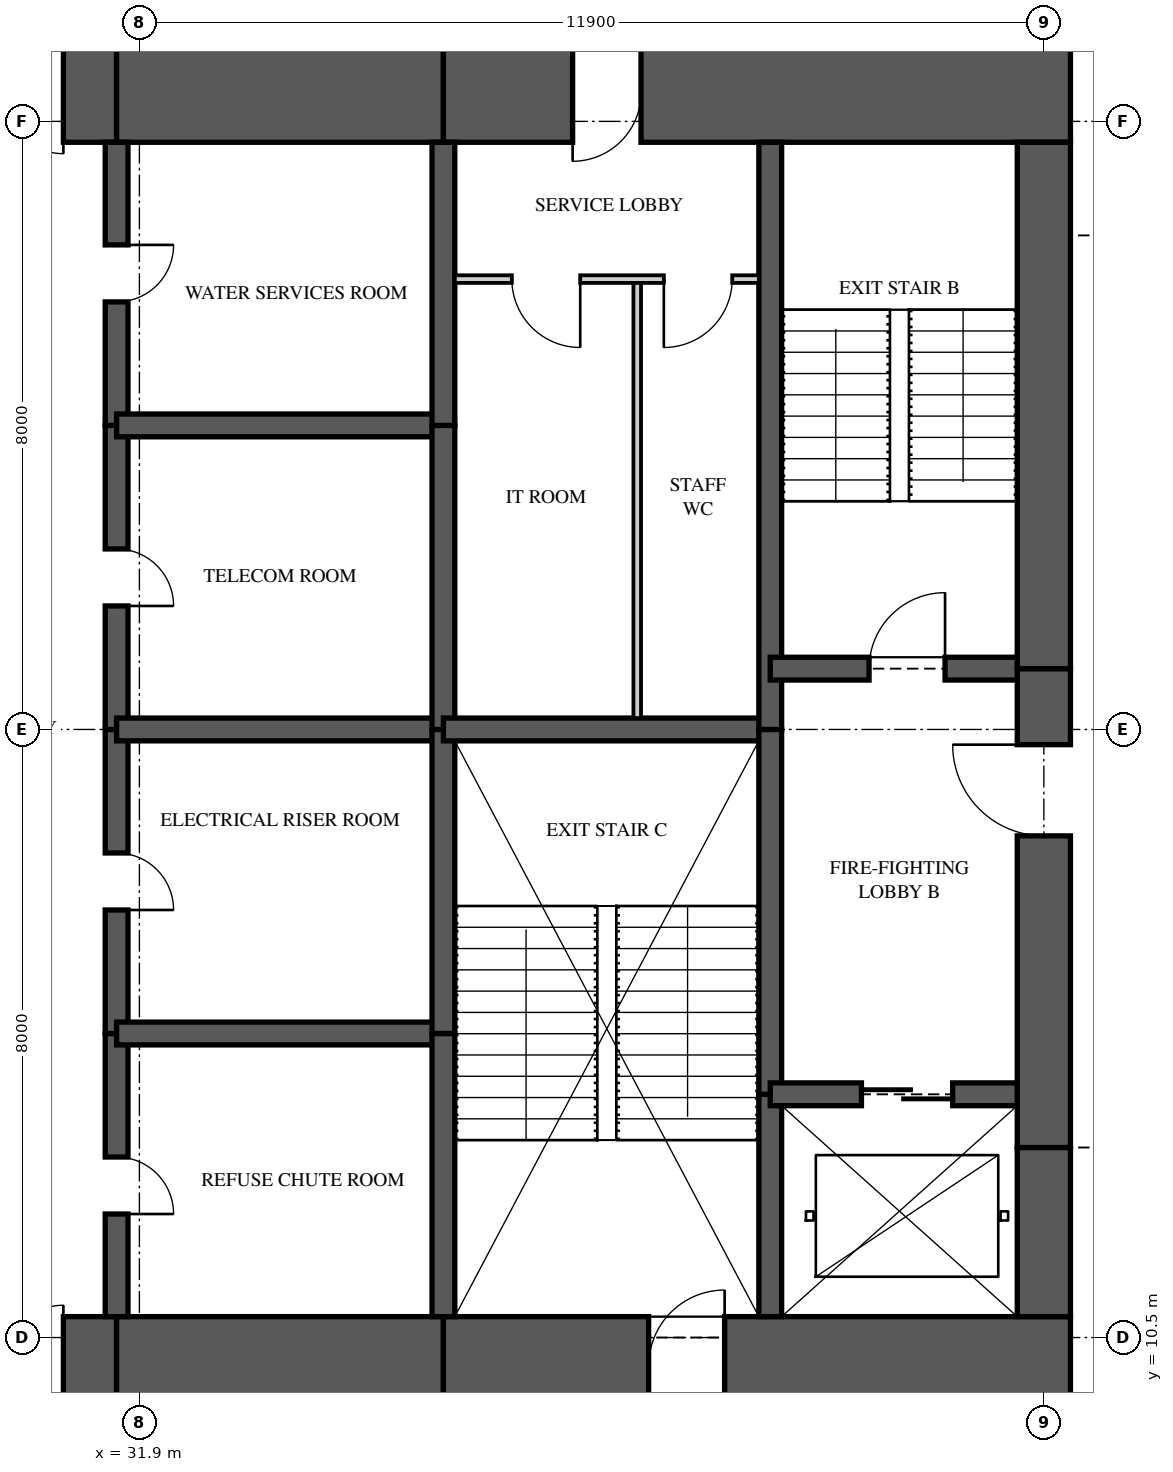
"""IFC4 building model, lengths in metres.
Left out: names, types, materials, properties, quantities, classifications, styles, units other than length and angle.
Written with IfcOpenShell. Run it as: python <this file> out.ifc"""

import sys

from ifc_helpers import new_model, si_unit, direction, frame, frame_2d, origin, place, context, subcontext, project, spatial, rectangle, extrude, element, fill, save


model = new_model("IFC4")
c1 = context("Model", 3, precision=1e-05, world=origin(), true_north=direction((0.0, 1.0)))
c2 = subcontext(c1, "Body", "Model", "MODEL_VIEW")
j1 = project(units=[si_unit("LENGTHUNIT", "METRE"), si_unit("PLANEANGLEUNIT", "RADIAN")], contexts=[c1])
p1 = place(None, origin())
s1 = spatial("IfcSite", under=j1, at=p1, CompositionType="ELEMENT")
p2 = place(p1, origin())
s2 = spatial("IfcBuilding", under=s1, at=p2, CompositionType="ELEMENT")
p3 = place(p2, frame((0.0, 0.0, 164.4)))
s3 = spatial("IfcBuildingStorey", under=s2, at=p3, CompositionType="ELEMENT", Elevation=164.4)
p4 = place(p3, frame((26.0, 10.125, 0.0), z_axis=(0.0, 0.0, 1.0), x_axis=(1.0, 0.0, 0.0)))
e1 = element("IfcWall", 1, at=p4, inside=s3, PredefinedType="SHEAR", context=c2, shape_type="SweptSolid", body=[
    extrude(rectangle(XDim=5.6, YDim=1.3, at=frame_2d((2.8, 0.0))), origin(), (0.0, 0.0, 1.0), 3.35),
])
p5 = place(p4, frame((3.3, 0.0, 0.0)))
e2 = element("IfcOpeningElement", 2, at=p5, cuts=e1, PredefinedType="OPENING", context=c2, shape_type="SweptSolid", body=[
    extrude(rectangle(XDim=1.6, YDim=2.1, at=frame_2d((0.8, 1.05))), frame((0.0, 0.66, 0.0), z_axis=(0.0, -1.0, 0.0), x_axis=(1.0, 0.0, 0.0)), (0.0, 0.0, 1.0), 1.32),
])
p6 = place(p3, frame((31.6, 10.125, 0.0), z_axis=(0.0, 0.0, 1.0), x_axis=(1.0, 0.0, 0.0)))
e3 = element("IfcWall", 3, at=p6, inside=s3, PredefinedType="SHEAR", context=c2, shape_type="SweptSolid", body=[
    extrude(rectangle(XDim=4.3, YDim=1.3, at=frame_2d((2.15, 0.0))), origin(), (0.0, 0.0, 1.0), 3.35),
])
p7 = place(p3, frame((35.9, 10.125, 0.0), z_axis=(0.0, 0.0, 1.0), x_axis=(1.0, 0.0, 0.0)))
e4 = element("IfcWall", 4, at=p7, inside=s3, PredefinedType="SHEAR", context=c2, shape_type="SweptSolid", body=[
    extrude(rectangle(XDim=8.25, YDim=1.3, at=frame_2d((4.125, 0.0))), origin(), (0.0, 0.0, 1.0), 3.35),
])
p8 = place(p7, frame((2.7, 0.0, 0.0)))
e5 = element("IfcOpeningElement", 5, at=p8, cuts=e4, PredefinedType="OPENING", context=c2, shape_type="SweptSolid", body=[
    extrude(rectangle(XDim=1.0, YDim=2.1, at=frame_2d((0.5, 1.05))), frame((0.0, 0.66, 0.0), z_axis=(0.0, -1.0, 0.0), x_axis=(1.0, 0.0, 0.0)), (0.0, 0.0, 1.0), 1.32),
])
p9 = place(p3, frame((44.15, 26.875, 0.0), z_axis=(0.0, 0.0, 1.0), x_axis=(-1.0, 0.0, 0.0)))
e6 = element("IfcWall", 6, at=p9, inside=s3, PredefinedType="SHEAR", context=c2, shape_type="SweptSolid", body=[
    extrude(rectangle(XDim=8.25, YDim=1.3, at=frame_2d((4.125, 0.0))), origin(), (0.0, 0.0, 1.0), 3.35),
])
p10 = place(p9, frame((5.65, 0.0, 0.0)))
e7 = element("IfcOpeningElement", 7, at=p10, cuts=e6, PredefinedType="OPENING", context=c2, shape_type="SweptSolid", body=[
    extrude(rectangle(XDim=0.9, YDim=2.1, at=frame_2d((0.45, 1.05))), frame((0.0, 0.66, 0.0), z_axis=(0.0, -1.0, 0.0), x_axis=(1.0, 0.0, 0.0)), (0.0, 0.0, 1.0), 1.32),
])
p11 = place(p3, frame((35.9, 26.875, 0.0), z_axis=(0.0, 0.0, 1.0), x_axis=(-1.0, 0.0, 0.0)))
e8 = element("IfcWall", 8, at=p11, inside=s3, PredefinedType="SHEAR", context=c2, shape_type="SweptSolid", body=[
    extrude(rectangle(XDim=4.3, YDim=1.3, at=frame_2d((2.15, 0.0))), origin(), (0.0, 0.0, 1.0), 3.35),
])
p12 = place(p3, frame((31.6, 26.875, 0.0), z_axis=(0.0, 0.0, 1.0), x_axis=(-1.0, 0.0, 0.0)))
e9 = element("IfcWall", 9, at=p12, inside=s3, PredefinedType="SHEAR", context=c2, shape_type="SweptSolid", body=[
    extrude(rectangle(XDim=5.6, YDim=1.3, at=frame_2d((2.8, 0.0))), origin(), (0.0, 0.0, 1.0), 3.35),
])
p13 = place(p12, frame((0.7, 0.0, 0.0)))
e10 = element("IfcOpeningElement", 10, at=p13, cuts=e9, PredefinedType="OPENING", context=c2, shape_type="SweptSolid", body=[
    extrude(rectangle(XDim=1.6, YDim=2.1, at=frame_2d((0.8, 1.05))), frame((0.0, 0.66, 0.0), z_axis=(0.0, -1.0, 0.0), x_axis=(1.0, 0.0, 0.0)), (0.0, 0.0, 1.0), 1.32),
])
p14 = place(p3, frame((43.8, 10.775, 0.0), z_axis=(0.0, 0.0, 1.0), x_axis=(0.0, 1.0, 0.0)))
e11 = element("IfcWall", 11, at=p14, inside=s3, PredefinedType="SHEAR", context=c2, shape_type="SweptSolid", body=[
    extrude(rectangle(XDim=2.225, YDim=0.7, at=frame_2d((1.113, 0.0))), origin(), (0.0, 0.0, 1.0), 3.35),
])
p15 = place(p3, frame((43.8, 13.0, 0.0), z_axis=(0.0, 0.0, 1.0), x_axis=(0.0, 1.0, 0.0)))
e12 = element("IfcWall", 12, at=p15, inside=s3, PredefinedType="SHEAR", context=c2, shape_type="SweptSolid", body=[
    extrude(rectangle(XDim=6.3, YDim=0.7, at=frame_2d((3.15, 0.0))), origin(), (0.0, 0.0, 1.0), 3.35),
])
p16 = place(p15, frame((4.1, 0.0, 0.0)))
e13 = element("IfcOpeningElement", 13, at=p16, cuts=e12, PredefinedType="OPENING", context=c2, shape_type="SweptSolid", body=[
    extrude(rectangle(XDim=1.2, YDim=2.2, at=frame_2d((0.6, 1.1))), frame((0.0, 0.36, 0.0), z_axis=(0.0, -1.0, 0.0), x_axis=(1.0, 0.0, 0.0)), (0.0, 0.0, 1.0), 0.72),
])
p17 = place(p3, frame((43.8, 19.3, 0.0), z_axis=(0.0, 0.0, 1.0), x_axis=(0.0, 1.0, 0.0)))
e14 = element("IfcWall", 14, at=p17, inside=s3, PredefinedType="SHEAR", context=c2, shape_type="SweptSolid", body=[
    extrude(rectangle(XDim=6.925, YDim=0.7, at=frame_2d((3.462, 0.0))), origin(), (0.0, 0.0, 1.0), 3.35),
])
p18 = place(p3, frame((31.6, 10.775, 0.0), z_axis=(0.0, 0.0, 1.0), x_axis=(0.0, 1.0, 0.0)))
e15 = element("IfcWall", 15, at=p18, inside=s3, PredefinedType="SHEAR", context=c2, shape_type="SweptSolid", body=[
    extrude(rectangle(XDim=3.725, YDim=0.3, at=frame_2d((1.863, 0.0))), origin(), (0.0, 0.0, 1.0), 3.35),
])
p19 = place(p18, frame((1.35, 0.0, 0.0)))
e16 = element("IfcOpeningElement", 16, at=p19, cuts=e15, PredefinedType="OPENING", context=c2, shape_type="SweptSolid", body=[
    extrude(rectangle(XDim=0.75, YDim=2.1, at=frame_2d((0.375, 1.05))), frame((0.0, 0.16, 0.0), z_axis=(0.0, -1.0, 0.0), x_axis=(1.0, 0.0, 0.0)), (0.0, 0.0, 1.0), 0.32),
])
p20 = place(p3, frame((31.6, 14.5, 0.0), z_axis=(0.0, 0.0, 1.0), x_axis=(0.0, 1.0, 0.0)))
e17 = element("IfcWall", 17, at=p20, inside=s3, PredefinedType="SHEAR", context=c2, shape_type="SweptSolid", body=[
    extrude(rectangle(XDim=4.0, YDim=0.3, at=frame_2d((2.0, 0.0))), origin(), (0.0, 0.0, 1.0), 3.35),
])
p21 = place(p20, frame((1.625, 0.0, 0.0)))
e18 = element("IfcOpeningElement", 18, at=p21, cuts=e17, PredefinedType="OPENING", context=c2, shape_type="SweptSolid", body=[
    extrude(rectangle(XDim=0.75, YDim=2.1, at=frame_2d((0.375, 1.05))), frame((0.0, 0.16, 0.0), z_axis=(0.0, -1.0, 0.0), x_axis=(1.0, 0.0, 0.0)), (0.0, 0.0, 1.0), 0.32),
])
p22 = place(p3, frame((31.6, 18.5, 0.0), z_axis=(0.0, 0.0, 1.0), x_axis=(0.0, 1.0, 0.0)))
e19 = element("IfcWall", 19, at=p22, inside=s3, PredefinedType="SHEAR", context=c2, shape_type="SweptSolid", body=[
    extrude(rectangle(XDim=4.0, YDim=0.3, at=frame_2d((2.0, 0.0))), origin(), (0.0, 0.0, 1.0), 3.35),
])
p23 = place(p22, frame((1.625, 0.0, 0.0)))
e20 = element("IfcOpeningElement", 20, at=p23, cuts=e19, PredefinedType="OPENING", context=c2, shape_type="SweptSolid", body=[
    extrude(rectangle(XDim=0.75, YDim=2.1, at=frame_2d((0.375, 1.05))), frame((0.0, 0.16, 0.0), z_axis=(0.0, -1.0, 0.0), x_axis=(1.0, 0.0, 0.0)), (0.0, 0.0, 1.0), 0.32),
])
p24 = place(p3, frame((31.6, 22.5, 0.0), z_axis=(0.0, 0.0, 1.0), x_axis=(0.0, 1.0, 0.0)))
e21 = element("IfcWall", 21, at=p24, inside=s3, PredefinedType="SHEAR", context=c2, shape_type="SweptSolid", body=[
    extrude(rectangle(XDim=3.725, YDim=0.3, at=frame_2d((1.863, 0.0))), origin(), (0.0, 0.0, 1.0), 3.35),
])
p25 = place(p24, frame((1.625, 0.0, 0.0)))
e22 = element("IfcOpeningElement", 22, at=p25, cuts=e21, PredefinedType="OPENING", context=c2, shape_type="SweptSolid", body=[
    extrude(rectangle(XDim=0.75, YDim=2.1, at=frame_2d((0.375, 1.05))), frame((0.0, 0.16, 0.0), z_axis=(0.0, -1.0, 0.0), x_axis=(1.0, 0.0, 0.0)), (0.0, 0.0, 1.0), 0.32),
])
p26 = place(p3, frame((35.9, 10.775, 0.0), z_axis=(0.0, 0.0, 1.0), x_axis=(0.0, 1.0, 0.0)))
e23 = element("IfcWall", 23, at=p26, inside=s3, PredefinedType="SHEAR", context=c2, shape_type="SweptSolid", body=[
    extrude(rectangle(XDim=3.725, YDim=0.3, at=frame_2d((1.863, 0.0))), origin(), (0.0, 0.0, 1.0), 3.35),
])
for number, where, z_axis, x_axis in (
    (24, (35.9, 14.5, 0.0), (0.0, 0.0, 1.0), (0.0, 1.0, 0.0)),
    (25, (35.9, 18.5, 0.0), (0.0, 0.0, 1.0), (0.0, 1.0, 0.0)),
):
    element("IfcWall", number, at=place(p3, frame(where, z_axis=z_axis, x_axis=x_axis)), inside=s3, PredefinedType="SHEAR", context=c2, shape_type="SweptSolid", body=[
        extrude(rectangle(XDim=4.0, YDim=0.3, at=frame_2d((2.0, 0.0))), origin(), (0.0, 0.0, 1.0), 3.35),
    ])
p27 = place(p3, frame((35.9, 22.5, 0.0), z_axis=(0.0, 0.0, 1.0), x_axis=(0.0, 1.0, 0.0)))
e26 = element("IfcWall", 26, at=p27, inside=s3, PredefinedType="SHEAR", context=c2, shape_type="SweptSolid", body=[
    extrude(rectangle(XDim=3.725, YDim=0.3, at=frame_2d((1.863, 0.0))), origin(), (0.0, 0.0, 1.0), 3.35),
])
p28 = place(p3, frame((40.2, 10.775, 0.0), z_axis=(0.0, 0.0, 1.0), x_axis=(0.0, 1.0, 0.0)))
e27 = element("IfcWall", 27, at=p28, inside=s3, PredefinedType="SHEAR", context=c2, shape_type="SweptSolid", body=[
    extrude(rectangle(XDim=2.925, YDim=0.3, at=frame_2d((1.462, 0.0))), origin(), (0.0, 0.0, 1.0), 3.35),
])
p29 = place(p3, frame((40.2, 13.7, 0.0), z_axis=(0.0, 0.0, 1.0), x_axis=(0.0, 1.0, 0.0)))
e28 = element("IfcWall", 28, at=p29, inside=s3, PredefinedType="SHEAR", context=c2, shape_type="SweptSolid", body=[
    extrude(rectangle(XDim=4.8, YDim=0.3, at=frame_2d((2.4, 0.0))), origin(), (0.0, 0.0, 1.0), 3.35),
])
p30 = place(p3, frame((40.2, 18.5, 0.0), z_axis=(0.0, 0.0, 1.0), x_axis=(0.0, 1.0, 0.0)))
e29 = element("IfcWall", 29, at=p30, inside=s3, PredefinedType="SHEAR", context=c2, shape_type="SweptSolid", body=[
    extrude(rectangle(XDim=7.725, YDim=0.3, at=frame_2d((3.863, 0.0))), origin(), (0.0, 0.0, 1.0), 3.35),
])
for number, where, z_axis, x_axis in (
    (30, (31.6, 14.5, 0.0), (0.0, 0.0, 1.0), (1.0, 0.0, 0.0)),
    (31, (31.6, 18.5, 0.0), (0.0, 0.0, 1.0), (1.0, 0.0, 0.0)),
    (32, (31.6, 22.5, 0.0), (0.0, 0.0, 1.0), (1.0, 0.0, 0.0)),
):
    element("IfcWall", number, at=place(p3, frame(where, z_axis=z_axis, x_axis=x_axis)), inside=s3, PredefinedType="SHEAR", context=c2, shape_type="SweptSolid", body=[
        extrude(rectangle(XDim=4.3, YDim=0.3, at=frame_2d((2.15, 0.0))), origin(), (0.0, 0.0, 1.0), 3.35),
    ])
p31 = place(p3, frame((35.9, 18.5, 0.0), z_axis=(0.0, 0.0, 1.0), x_axis=(1.0, 0.0, 0.0)))
e33 = element("IfcWall", 33, at=p31, inside=s3, PredefinedType="SHEAR", context=c2, shape_type="SweptSolid", body=[
    extrude(rectangle(XDim=4.3, YDim=0.3, at=frame_2d((2.15, 0.0))), origin(), (0.0, 0.0, 1.0), 3.35),
])
p32 = place(p3, frame((40.2, 13.7, 0.0), z_axis=(0.0, 0.0, 1.0), x_axis=(1.0, 0.0, 0.0)))
e34 = element("IfcWall", 34, at=p32, inside=s3, PredefinedType="SHEAR", context=c2, shape_type="SweptSolid", body=[
    extrude(rectangle(XDim=3.6, YDim=0.3, at=frame_2d((1.8, 0.0))), origin(), (0.0, 0.0, 1.0), 3.35),
])
p33 = place(p32, frame((1.2, 0.0, 0.0)))
e35 = element("IfcOpeningElement", 35, at=p33, cuts=e34, PredefinedType="OPENING", context=c2, shape_type="SweptSolid", body=[
    extrude(rectangle(XDim=1.2, YDim=2.1, at=frame_2d((0.6, 1.05))), frame((0.0, 0.16, 0.0), z_axis=(0.0, -1.0, 0.0), x_axis=(1.0, 0.0, 0.0)), (0.0, 0.0, 1.0), 0.32),
])
p34 = place(p3, frame((40.2, 19.3, 0.0), z_axis=(0.0, 0.0, 1.0), x_axis=(1.0, 0.0, 0.0)))
e36 = element("IfcWall", 36, at=p34, inside=s3, PredefinedType="SHEAR", context=c2, shape_type="SweptSolid", body=[
    extrude(rectangle(XDim=3.6, YDim=0.3, at=frame_2d((1.8, 0.0))), origin(), (0.0, 0.0, 1.0), 3.35),
])
p35 = place(p34, frame((1.3, 0.0, 0.0)))
e37 = element("IfcOpeningElement", 37, at=p35, cuts=e36, PredefinedType="OPENING", context=c2, shape_type="SweptSolid", body=[
    extrude(rectangle(XDim=1.0, YDim=2.1, at=frame_2d((0.5, 1.05))), frame((0.0, 0.16, 0.0), z_axis=(0.0, -1.0, 0.0), x_axis=(1.0, 0.0, 0.0)), (0.0, 0.0, 1.0), 0.32),
])
p36 = place(p3, frame((36.05, 24.425, 0.0), z_axis=(0.0, 0.0, 1.0), x_axis=(1.0, 0.0, 0.0)))
e38 = element("IfcWall", 38, at=p36, inside=s3, PredefinedType="PARTITIONING", context=c2, shape_type="SweptSolid", body=[
    extrude(rectangle(XDim=4.0, YDim=0.1, at=frame_2d((2.0, 0.0))), origin(), (0.0, 0.0, 1.0), 3.11),
])
p37 = place(p36, frame((0.75, 0.0, 0.0)))
e39 = element("IfcOpeningElement", 39, at=p37, cuts=e38, PredefinedType="OPENING", context=c2, shape_type="SweptSolid", body=[
    extrude(rectangle(XDim=0.9, YDim=2.1, at=frame_2d((0.45, 1.05))), frame((0.0, 0.06, 0.0), z_axis=(0.0, -1.0, 0.0), x_axis=(1.0, 0.0, 0.0)), (0.0, 0.0, 1.0), 0.12),
])
p38 = place(p36, frame((2.75, 0.0, 0.0)))
e40 = element("IfcOpeningElement", 40, at=p38, cuts=e38, PredefinedType="OPENING", context=c2, shape_type="SweptSolid", body=[
    extrude(rectangle(XDim=0.9, YDim=2.1, at=frame_2d((0.45, 1.05))), frame((0.0, 0.06, 0.0), z_axis=(0.0, -1.0, 0.0), x_axis=(1.0, 0.0, 0.0)), (0.0, 0.0, 1.0), 0.12),
])
p39 = place(p3, frame((38.45, 18.65, 0.0), z_axis=(0.0, 0.0, 1.0), x_axis=(0.0, 1.0, 0.0)))
e41 = element("IfcWall", 41, at=p39, inside=s3, PredefinedType="PARTITIONING", context=c2, shape_type="SweptSolid", body=[
    extrude(rectangle(XDim=5.725, YDim=0.1, at=frame_2d((2.863, 0.0))), origin(), (0.0, 0.0, 1.0), 3.11),
])
p40 = place(p37, frame((0.9, 0.0, 0.0), z_axis=(0.0, 0.0, 1.0), x_axis=(-1.0, 0.0, 0.0)))
e42 = element("IfcDoor", 42, at=p40, inside=s3, OperationType="SINGLE_SWING_LEFT", PredefinedType="DOOR", context=c2, shape_type="SweptSolid", body=[
    extrude(rectangle(XDim=0.9, YDim=2.1, at=frame_2d((0.45, 1.05))), frame((0.0, 0.025, 0.0), z_axis=(0.0, -1.0, 0.0), x_axis=(1.0, 0.0, 0.0)), (0.0, 0.0, 1.0), 0.05),
])
fill(e39, e42)
p41 = place(p38, frame((0.9, 0.0, 0.0), z_axis=(0.0, 0.0, 1.0), x_axis=(-1.0, 0.0, 0.0)))
e43 = element("IfcDoor", 43, at=p41, inside=s3, OperationType="SINGLE_SWING_RIGHT", PredefinedType="DOOR", context=c2, shape_type="SweptSolid", body=[
    extrude(rectangle(XDim=0.9, YDim=2.1, at=frame_2d((0.45, 1.05))), frame((0.0, 0.025, 0.0), z_axis=(0.0, -1.0, 0.0), x_axis=(1.0, 0.0, 0.0)), (0.0, 0.0, 1.0), 0.05),
])
fill(e40, e43)
p42 = place(p35, origin())
e44 = element("IfcDoor", 44, at=p42, inside=s3, OperationType="SINGLE_SWING_RIGHT", PredefinedType="DOOR", context=c2, shape_type="SweptSolid", body=[
    extrude(rectangle(XDim=1.0, YDim=2.1, at=frame_2d((0.5, 1.05))), frame((0.0, 0.025, 0.0), z_axis=(0.0, -1.0, 0.0), x_axis=(1.0, 0.0, 0.0)), (0.0, 0.0, 1.0), 0.05),
])
fill(e37, e44)
p43 = place(p16, origin())
e45 = element("IfcDoor", 45, at=p43, inside=s3, OperationType="SINGLE_SWING_RIGHT", PredefinedType="DOOR", context=c2, shape_type="SweptSolid", body=[
    extrude(rectangle(XDim=1.2, YDim=2.2, at=frame_2d((0.6, 1.1))), frame((0.0, 0.025, 0.0), z_axis=(0.0, -1.0, 0.0), x_axis=(1.0, 0.0, 0.0)), (0.0, 0.0, 1.0), 0.05),
])
fill(e13, e45)
p44 = place(p33, origin())
e46 = element("IfcDoor", 46, at=p44, inside=s3, OperationType="SLIDING_TO_LEFT", PredefinedType="DOOR", context=c2, shape_type="SweptSolid", body=[
    extrude(rectangle(XDim=1.2, YDim=2.1, at=frame_2d((0.6, 1.05))), frame((0.0, 0.025, 0.0), z_axis=(0.0, -1.0, 0.0), x_axis=(1.0, 0.0, 0.0)), (0.0, 0.0, 1.0), 0.05),
])
fill(e35, e46)
p45 = place(p5, origin())
e47 = element("IfcDoor", 47, at=p45, inside=s3, OperationType="DOUBLE_DOOR_SINGLE_SWING", PredefinedType="DOOR", context=c2, shape_type="SweptSolid", body=[
    extrude(rectangle(XDim=1.6, YDim=2.1, at=frame_2d((0.8, 1.05))), frame((0.0, 0.025, 0.0), z_axis=(0.0, -1.0, 0.0), x_axis=(1.0, 0.0, 0.0)), (0.0, 0.0, 1.0), 0.05),
])
fill(e2, e47)
p46 = place(p13, origin())
e48 = element("IfcDoor", 48, at=p46, inside=s3, OperationType="DOUBLE_DOOR_SINGLE_SWING", PredefinedType="DOOR", context=c2, shape_type="SweptSolid", body=[
    extrude(rectangle(XDim=1.6, YDim=2.1, at=frame_2d((0.8, 1.05))), frame((0.0, 0.025, 0.0), z_axis=(0.0, -1.0, 0.0), x_axis=(1.0, 0.0, 0.0)), (0.0, 0.0, 1.0), 0.05),
])
fill(e10, e48)
p47 = place(p19, frame((0.75, 0.0, 0.0), z_axis=(0.0, 0.0, 1.0), x_axis=(-1.0, 0.0, 0.0)))
e49 = element("IfcDoor", 49, at=p47, inside=s3, OperationType="SINGLE_SWING_RIGHT", PredefinedType="DOOR", context=c2, shape_type="SweptSolid", body=[
    extrude(rectangle(XDim=0.75, YDim=2.1, at=frame_2d((0.375, 1.05))), frame((0.0, 0.025, 0.0), z_axis=(0.0, -1.0, 0.0), x_axis=(1.0, 0.0, 0.0)), (0.0, 0.0, 1.0), 0.05),
])
fill(e16, e49)
p48 = place(p21, frame((0.75, 0.0, 0.0), z_axis=(0.0, 0.0, 1.0), x_axis=(-1.0, 0.0, 0.0)))
e50 = element("IfcDoor", 50, at=p48, inside=s3, OperationType="SINGLE_SWING_RIGHT", PredefinedType="DOOR", context=c2, shape_type="SweptSolid", body=[
    extrude(rectangle(XDim=0.75, YDim=2.1, at=frame_2d((0.375, 1.05))), frame((0.0, 0.025, 0.0), z_axis=(0.0, -1.0, 0.0), x_axis=(1.0, 0.0, 0.0)), (0.0, 0.0, 1.0), 0.05),
])
fill(e18, e50)
p49 = place(p23, frame((0.75, 0.0, 0.0), z_axis=(0.0, 0.0, 1.0), x_axis=(-1.0, 0.0, 0.0)))
e51 = element("IfcDoor", 51, at=p49, inside=s3, OperationType="SINGLE_SWING_RIGHT", PredefinedType="DOOR", context=c2, shape_type="SweptSolid", body=[
    extrude(rectangle(XDim=0.75, YDim=2.1, at=frame_2d((0.375, 1.05))), frame((0.0, 0.025, 0.0), z_axis=(0.0, -1.0, 0.0), x_axis=(1.0, 0.0, 0.0)), (0.0, 0.0, 1.0), 0.05),
])
fill(e20, e51)
p50 = place(p25, frame((0.75, 0.0, 0.0), z_axis=(0.0, 0.0, 1.0), x_axis=(-1.0, 0.0, 0.0)))
e52 = element("IfcDoor", 52, at=p50, inside=s3, OperationType="SINGLE_SWING_LEFT", PredefinedType="DOOR", context=c2, shape_type="SweptSolid", body=[
    extrude(rectangle(XDim=0.75, YDim=2.1, at=frame_2d((0.375, 1.05))), frame((0.0, 0.025, 0.0), z_axis=(0.0, -1.0, 0.0), x_axis=(1.0, 0.0, 0.0)), (0.0, 0.0, 1.0), 0.05),
])
fill(e22, e52)
p51 = place(p8, origin())
e53 = element("IfcDoor", 53, at=p51, inside=s3, OperationType="SINGLE_SWING_RIGHT", PredefinedType="DOOR", context=c2, shape_type="SweptSolid", body=[
    extrude(rectangle(XDim=1.0, YDim=2.1, at=frame_2d((0.5, 1.05))), frame((0.0, 0.025, 0.0), z_axis=(0.0, -1.0, 0.0), x_axis=(1.0, 0.0, 0.0)), (0.0, 0.0, 1.0), 0.05),
])
fill(e5, e53)
p52 = place(p10, origin())
e54 = element("IfcDoor", 54, at=p52, inside=s3, OperationType="SINGLE_SWING_RIGHT", PredefinedType="DOOR", context=c2, shape_type="SweptSolid", body=[
    extrude(rectangle(XDim=0.9, YDim=2.1, at=frame_2d((0.45, 1.05))), frame((0.0, 0.47, 0.0), z_axis=(0.0, -1.0, 0.0), x_axis=(1.0, 0.0, 0.0)), (0.0, 0.0, 1.0), 0.8),
])
fill(e7, e54)
save(model, sys.argv[1])
